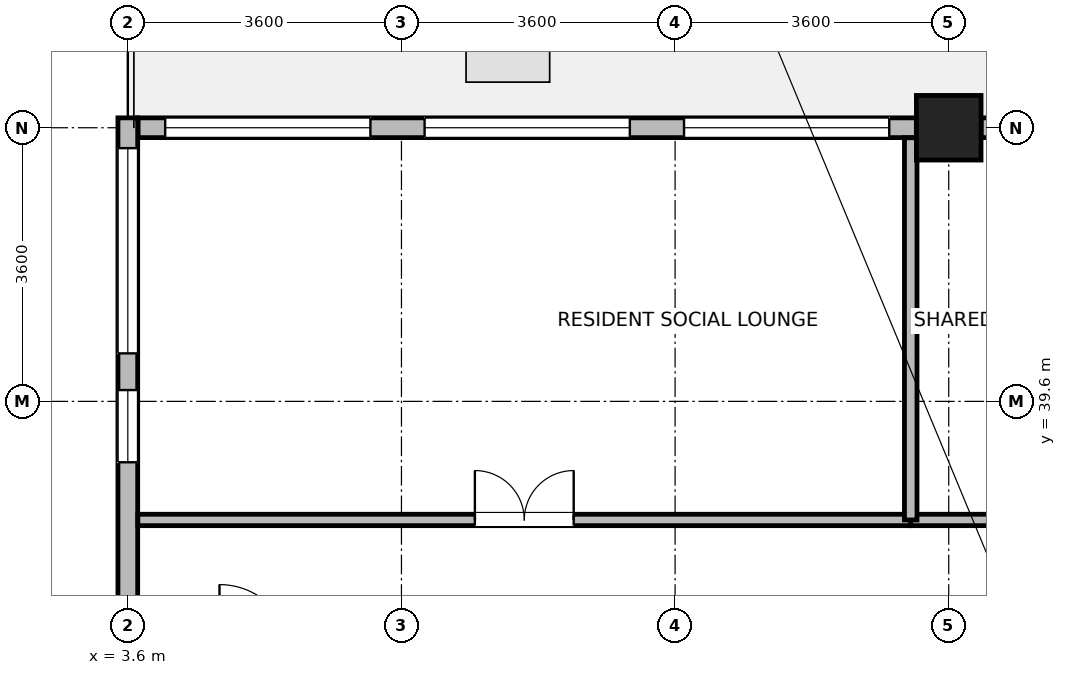
"""IFC4 building model, lengths in metres.
Left out: names, types, materials, properties, quantities, classifications, styles, units other than length and angle.
Written with IfcOpenShell. Run it as: python <this file> out.ifc"""

import sys

from ifc_helpers import new_model, si_unit, direction, frame, frame_2d, origin, origin_2d, place, context, subcontext, project, spatial, rectangle, extrude, source, transform, mapped, element, fill, save


model = new_model("IFC4")
c1 = context("Model", 3, precision=1e-05, world=origin(), true_north=direction((0.0, 1.0)))
c2 = subcontext(c1, "Body", "Model", "MODEL_VIEW")
j1 = project(units=[si_unit("LENGTHUNIT", "METRE"), si_unit("PLANEANGLEUNIT", "RADIAN")], contexts=[c1])
p1 = place(None, origin())
s1 = spatial("IfcSite", under=j1, at=p1, CompositionType="ELEMENT")
p2 = place(p1, origin())
s2 = spatial("IfcBuilding", under=s1, at=p2, CompositionType="ELEMENT")
p3 = place(p2, frame((0.0, 0.0, 249.9)))
s3 = spatial("IfcBuildingStorey", under=s2, at=p3, CompositionType="ELEMENT", Elevation=249.9)
m1 = source(origin(), c2, "Body", "SweptSolid", [
    extrude(rectangle(XDim=0.85, YDim=0.85, at=origin_2d()), origin(), (0.0, 0.0, 1.0), 3.7),
])
p4 = place(p3, frame((14.4, 43.2, 0.0), z_axis=(0.0, 0.0, 1.0), x_axis=(1.0, 0.0, 0.0)))
e1 = element("IfcColumn", 1, at=p4, inside=s3, PredefinedType="COLUMN", context=c2, shape_type="MappedRepresentation", body=[
    mapped(m1, transform((0.0, 0.0, 0.0), x_axis=(1.0, 0.0, 0.0), y_axis=(0.0, 1.0, 0.0), z_axis=(0.0, 0.0, 1.0), scale=1.0)),
])
p5 = place(p3, frame((14.826, 43.2, 0.0), z_axis=(0.0, 0.0, 1.0), x_axis=(1.0, 0.0, 0.0)))
e2 = element("IfcWall", 2, at=p5, inside=s3, PredefinedType="STANDARD", context=c2, shape_type="SweptSolid", body=[
    extrude(rectangle(XDim=2.986, YDim=0.26, at=frame_2d((1.493, 0.0))), origin(), (0.0, 0.0, 1.0), 3.055),
])
p6 = place(p5, frame((0.443, 0.0, 0.85)))
e3 = element("IfcOpeningElement", 3, at=p6, cuts=e2, PredefinedType="OPENING", context=c2, shape_type="SweptSolid", body=[
    extrude(rectangle(XDim=2.1, YDim=1.95, at=frame_2d((1.05, 0.975))), frame((0.0, 0.14, 0.0), z_axis=(0.0, -1.0, 0.0), x_axis=(1.0, 0.0, 0.0)), (0.0, 0.0, 1.0), 0.28),
])
p7 = place(p3, frame((3.735, 43.2, 0.0), z_axis=(0.0, 0.0, 1.0), x_axis=(1.0, 0.0, 0.0)))
e4 = element("IfcWall", 4, at=p7, inside=s3, PredefinedType="STANDARD", context=c2, shape_type="SweptSolid", body=[
    extrude(rectangle(XDim=10.239, YDim=0.26, at=frame_2d((5.12, 0.0))), origin(), (0.0, 0.0, 1.0), 3.455),
])
p8 = place(p7, frame((0.356, 0.0, 0.85)))
e5 = element("IfcOpeningElement", 5, at=p8, cuts=e4, PredefinedType="OPENING", context=c2, shape_type="SweptSolid", body=[
    extrude(rectangle(XDim=2.7, YDim=2.05, at=frame_2d((1.35, 1.025))), frame((0.0, 0.14, 0.0), z_axis=(0.0, -1.0, 0.0), x_axis=(1.0, 0.0, 0.0)), (0.0, 0.0, 1.0), 0.28),
])
p9 = place(p7, frame((3.77, 0.0, 0.85)))
e6 = element("IfcOpeningElement", 6, at=p9, cuts=e4, PredefinedType="OPENING", context=c2, shape_type="SweptSolid", body=[
    extrude(rectangle(XDim=2.7, YDim=2.05, at=frame_2d((1.35, 1.025))), frame((0.0, 0.14, 0.0), z_axis=(0.0, -1.0, 0.0), x_axis=(1.0, 0.0, 0.0)), (0.0, 0.0, 1.0), 0.28),
])
p10 = place(p7, frame((7.183, 0.0, 0.85)))
e7 = element("IfcOpeningElement", 7, at=p10, cuts=e4, PredefinedType="OPENING", context=c2, shape_type="SweptSolid", body=[
    extrude(rectangle(XDim=2.7, YDim=2.05, at=frame_2d((1.35, 1.025))), frame((0.0, 0.14, 0.0), z_axis=(0.0, -1.0, 0.0), x_axis=(1.0, 0.0, 0.0)), (0.0, 0.0, 1.0), 0.28),
])
p11 = place(p3, frame((3.6, 36.337, 0.0), z_axis=(0.0, 0.0, 1.0), x_axis=(0.0, 1.0, 0.0)))
e8 = element("IfcWall", 8, at=p11, inside=s3, PredefinedType="STANDARD", context=c2, shape_type="SweptSolid", body=[
    extrude(rectangle(XDim=6.993, YDim=0.26, at=frame_2d((3.497, 0.0))), origin(), (0.0, 0.0, 1.0), 3.455),
])
p12 = place(p11, frame((3.895, 0.0, 0.85)))
e9 = element("IfcOpeningElement", 9, at=p12, cuts=e8, PredefinedType="OPENING", context=c2, shape_type="SweptSolid", body=[
    extrude(rectangle(XDim=2.7, YDim=2.05, at=frame_2d((1.35, 1.025))), frame((0.0, 0.14, 0.0), z_axis=(0.0, -1.0, 0.0), x_axis=(1.0, 0.0, 0.0)), (0.0, 0.0, 1.0), 0.28),
])
p13 = place(p11, frame((2.462, 0.0, 0.85)))
e10 = element("IfcOpeningElement", 10, at=p13, cuts=e8, PredefinedType="OPENING", context=c2, shape_type="SweptSolid", body=[
    extrude(rectangle(XDim=0.95, YDim=1.75, at=frame_2d((0.475, 0.875))), frame((0.0, 0.14, 0.0), z_axis=(0.0, -1.0, 0.0), x_axis=(1.0, 0.0, 0.0)), (0.0, 0.0, 1.0), 0.28),
])
p14 = place(p3, frame((3.732, 38.04, 0.0), z_axis=(0.0, 0.0, 1.0), x_axis=(1.0, 0.0, 0.0)))
e11 = element("IfcWall", 11, at=p14, inside=s3, PredefinedType="PARTITIONING", context=c2, shape_type="SweptSolid", body=[
    extrude(rectangle(XDim=10.168, YDim=0.15, at=frame_2d((5.084, 0.0))), origin(), (0.0, 0.0, 1.0), 3.455),
])
p15 = place(p14, frame((4.434, 0.0, 0.0)))
e12 = element("IfcOpeningElement", 12, at=p15, cuts=e11, PredefinedType="OPENING", context=c2, shape_type="SweptSolid", body=[
    extrude(rectangle(XDim=1.3, YDim=2.12, at=frame_2d((0.65, 1.06))), frame((0.0, 0.085, 0.0), z_axis=(0.0, -1.0, 0.0), x_axis=(1.0, 0.0, 0.0)), (0.0, 0.0, 1.0), 0.17),
])
p16 = place(p3, frame((13.9, 38.04, 0.0), z_axis=(0.0, 0.0, 1.0), x_axis=(1.0, 0.0, 0.0)))
e13 = element("IfcWall", 13, at=p16, inside=s3, PredefinedType="PARTITIONING", context=c2, shape_type="SweptSolid", body=[
    extrude(rectangle(XDim=9.38, YDim=0.15, at=frame_2d((4.69, 0.0))), origin(), (0.0, 0.0, 1.0), 3.455),
])
p17 = place(p16, frame((4.24, 0.0, 0.0)))
e14 = element("IfcOpeningElement", 14, at=p17, cuts=e13, PredefinedType="OPENING", context=c2, shape_type="SweptSolid", body=[
    extrude(rectangle(XDim=0.9, YDim=2.08, at=frame_2d((0.45, 1.04))), frame((0.0, 0.085, 0.0), z_axis=(0.0, -1.0, 0.0), x_axis=(1.0, 0.0, 0.0)), (0.0, 0.0, 1.0), 0.17),
])
p18 = place(p3, frame((13.9, 38.04, 0.0), z_axis=(0.0, 0.0, 1.0), x_axis=(0.0, 1.0, 0.0)))
e15 = element("IfcWall", 15, at=p18, inside=s3, PredefinedType="PARTITIONING", context=c2, shape_type="SweptSolid", body=[
    extrude(rectangle(XDim=5.028, YDim=0.165, at=frame_2d((2.514, 0.0))), origin(), (0.0, 0.0, 1.0), 3.455),
])
p19 = place(p8, origin())
e16 = element("IfcWindow", 16, at=p19, inside=s3, PartitioningType="SINGLE_PANEL", PredefinedType="WINDOW", context=c2, shape_type="SweptSolid", body=[
    extrude(rectangle(XDim=2.7, YDim=2.05, at=frame_2d((1.35, 1.025))), frame((0.0, 0.03, 0.0), z_axis=(0.0, -1.0, 0.0), x_axis=(1.0, 0.0, 0.0)), (0.0, 0.0, 1.0), 0.06),
])
fill(e5, e16)
p20 = place(p9, origin())
e17 = element("IfcWindow", 17, at=p20, inside=s3, PartitioningType="SINGLE_PANEL", PredefinedType="WINDOW", context=c2, shape_type="SweptSolid", body=[
    extrude(rectangle(XDim=2.7, YDim=2.05, at=frame_2d((1.35, 1.025))), frame((0.0, 0.03, 0.0), z_axis=(0.0, -1.0, 0.0), x_axis=(1.0, 0.0, 0.0)), (0.0, 0.0, 1.0), 0.06),
])
fill(e6, e17)
p21 = place(p10, origin())
e18 = element("IfcWindow", 18, at=p21, inside=s3, PartitioningType="SINGLE_PANEL", PredefinedType="WINDOW", context=c2, shape_type="SweptSolid", body=[
    extrude(rectangle(XDim=2.7, YDim=2.05, at=frame_2d((1.35, 1.025))), frame((0.0, 0.03, 0.0), z_axis=(0.0, -1.0, 0.0), x_axis=(1.0, 0.0, 0.0)), (0.0, 0.0, 1.0), 0.06),
])
fill(e7, e18)
p22 = place(p12, origin())
e19 = element("IfcWindow", 19, at=p22, inside=s3, PartitioningType="SINGLE_PANEL", PredefinedType="WINDOW", context=c2, shape_type="SweptSolid", body=[
    extrude(rectangle(XDim=2.7, YDim=2.05, at=frame_2d((1.35, 1.025))), frame((0.0, 0.03, 0.0), z_axis=(0.0, -1.0, 0.0), x_axis=(1.0, 0.0, 0.0)), (0.0, 0.0, 1.0), 0.06),
])
fill(e9, e19)
p23 = place(p13, origin())
e20 = element("IfcWindow", 20, at=p23, inside=s3, PartitioningType="SINGLE_PANEL", PredefinedType="WINDOW", context=c2, shape_type="SweptSolid", body=[
    extrude(rectangle(XDim=0.95, YDim=1.75, at=frame_2d((0.475, 0.875))), frame((0.0, 0.03, 0.0), z_axis=(0.0, -1.0, 0.0), x_axis=(1.0, 0.0, 0.0)), (0.0, 0.0, 1.0), 0.06),
])
fill(e10, e20)
p24 = place(p15, origin())
e21 = element("IfcDoor", 21, at=p24, inside=s3, OperationType="DOUBLE_DOOR_SINGLE_SWING", PredefinedType="DOOR", context=c2, shape_type="SweptSolid", body=[
    extrude(rectangle(XDim=1.3, YDim=2.12, at=frame_2d((0.65, 1.06))), frame((0.0, 0.025, 0.0), z_axis=(0.0, -1.0, 0.0), x_axis=(1.0, 0.0, 0.0)), (0.0, 0.0, 1.0), 0.05),
])
fill(e12, e21)
save(model, sys.argv[1])
